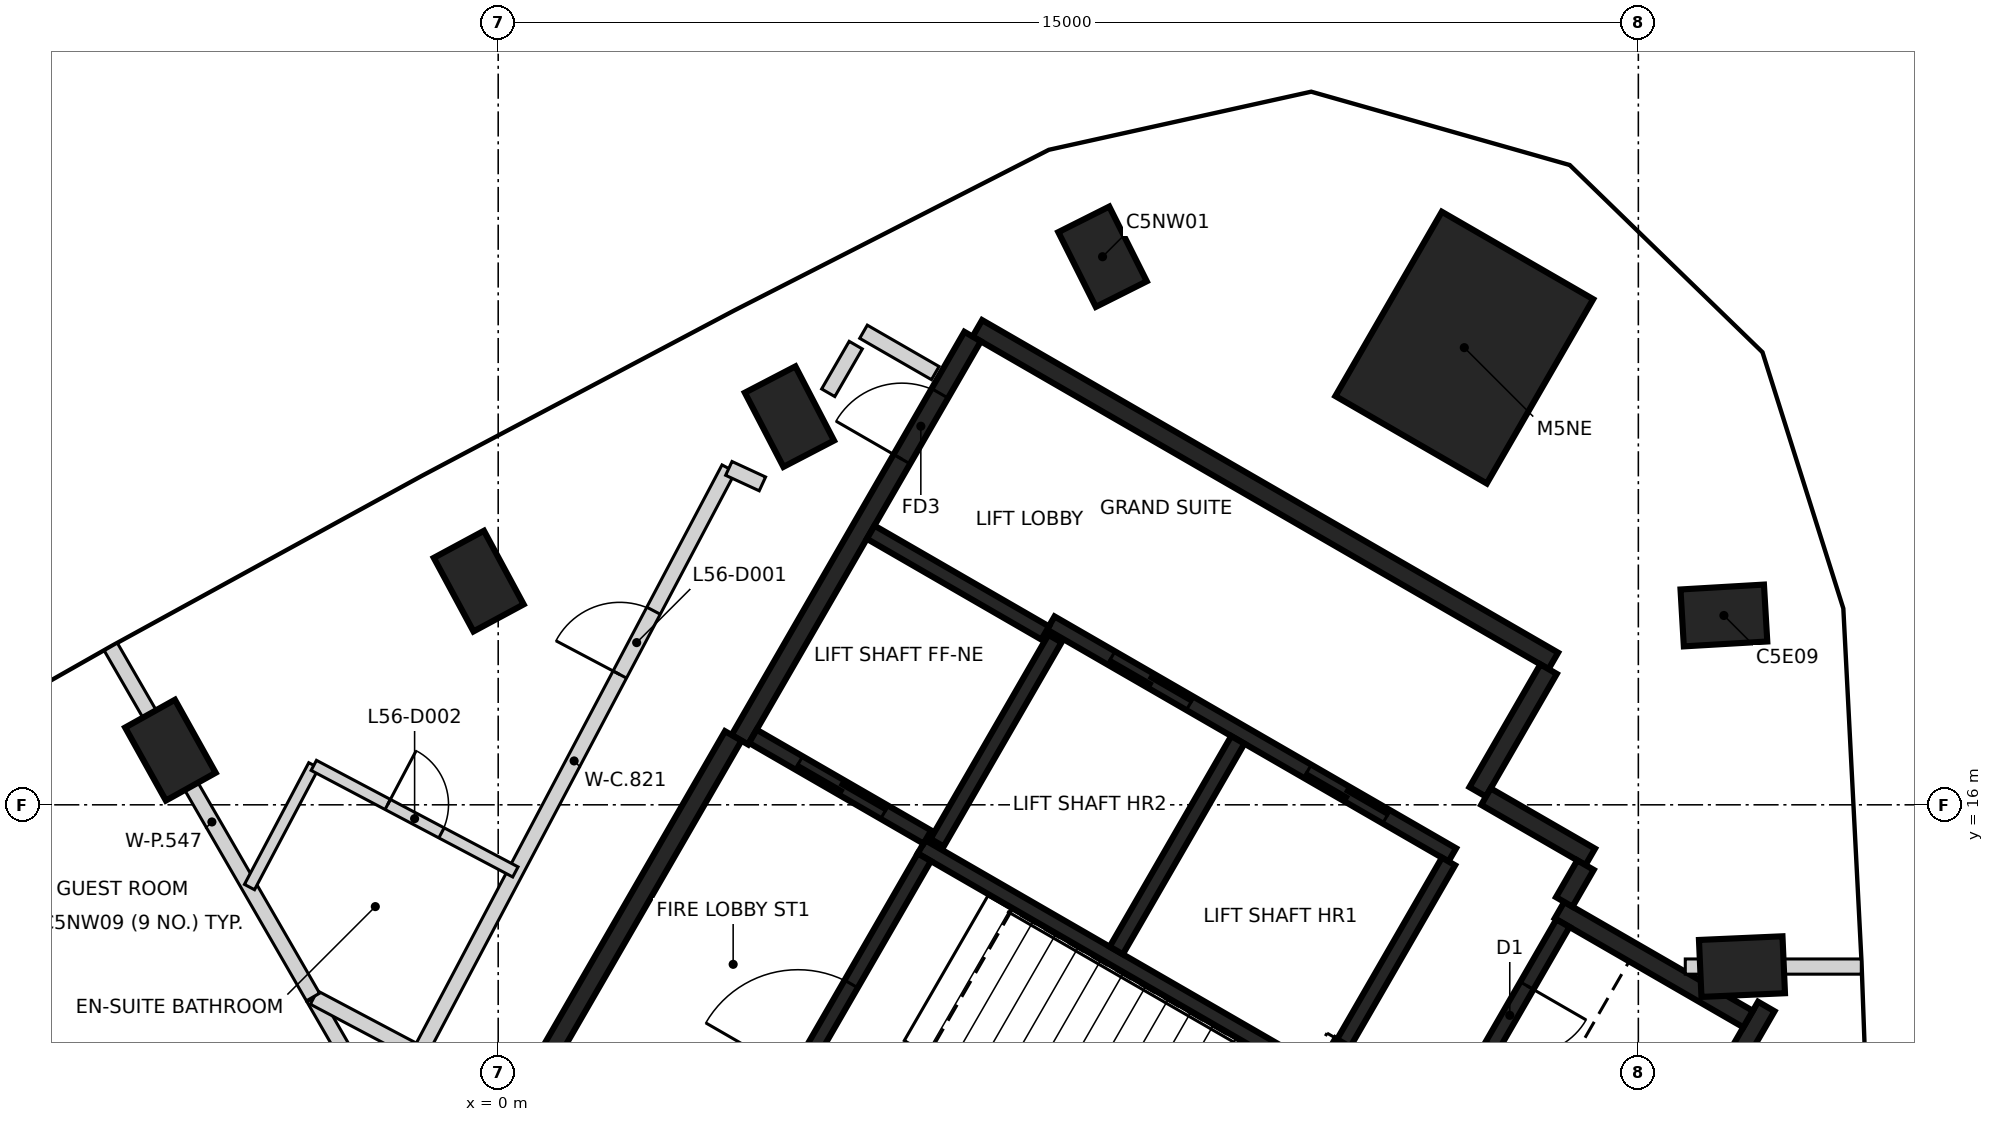
"""IFC4 building model, lengths in metres.
Left out: names, types, materials, properties, quantities, classifications, styles, units other than length and angle.
Written with IfcOpenShell. Run it as: python <this file> out.ifc"""

import sys

from ifc_helpers import new_model, si_unit, direction, frame, frame_2d, origin, origin_2d, place, context, subcontext, project, spatial, rectangle, extrude, element, fill, save


model = new_model("IFC4")
c1 = context("Model", 3, precision=1e-05, world=origin(), true_north=direction((0.0, 1.0)))
c2 = subcontext(c1, "Body", "Model", "MODEL_VIEW")
j1 = project(units=[si_unit("LENGTHUNIT", "METRE"), si_unit("PLANEANGLEUNIT", "RADIAN")], contexts=[c1])
p1 = place(None, origin())
s1 = spatial("IfcSite", under=j1, at=p1, CompositionType="ELEMENT")
p2 = place(p1, origin())
s2 = spatial("IfcBuilding", under=s1, at=p2, CompositionType="ELEMENT")
p3 = place(p2, frame((0.0, 0.0, 225.0)))
s3 = spatial("IfcBuildingStorey", under=s2, at=p3, CompositionType="ELEMENT", Elevation=225.0)
for number, where, z_axis, x_axis in (
    (1, (16.363, 13.872, -0.35), (0.0, 0.0, 1.0), (0.999, 0.044, 0.0)),
    (2, (16.125, 18.491, -0.35), (0.0, 0.0, 1.0), (0.998, 0.058, 0.0)),
    (3, (7.951, 23.211, -0.35), (0.0, 0.0, 1.0), (-0.449, 0.894, 0.0)),
    (4, (3.832, 21.107, -0.35), (0.0, 0.0, 1.0), (-0.461, 0.887, 0.0)),
    (5, (-0.256, 18.943, -0.35), (0.0, 0.0, 1.0), (-0.475, 0.88, 0.0)),
    (6, (-4.312, 16.719, -0.35), (0.0, 0.0, 1.0), (-0.487, 0.873, 0.0)),
):
    element("IfcColumn", number, at=place(p3, frame(where, z_axis=z_axis, x_axis=x_axis)), inside=s3, PredefinedType="COLUMN", context=c2, shape_type="SweptSolid", body=[
        extrude(rectangle(XDim=1.1, YDim=0.75, at=origin_2d()), origin(), (0.0, 0.0, 1.0), 3.6),
    ])
p4 = place(p3, frame((12.71, 22.015, -0.35), z_axis=(0.0, 0.0, 1.0), x_axis=(0.5, 0.866025403784, 0.0)))
e7 = element("IfcColumn", 7, at=p4, inside=s3, PredefinedType="COLUMN", context=c2, shape_type="SweptSolid", body=[
    extrude(rectangle(XDim=2.8, YDim=2.3, at=origin_2d()), origin(), (0.0, 0.0, 1.0), 3.6),
])
p5 = place(p3, frame((6.304, 22.269, 0.0), z_axis=(0.0, 0.0, 1.0), x_axis=(0.866022959057, -0.500004234368, 0.0)))
e8 = element("IfcWall", 8, at=p5, inside=s3, PredefinedType="SHEAR", context=c2, shape_type="SweptSolid", body=[
    extrude(rectangle(XDim=8.75, YDim=0.25, at=frame_2d((4.375, 0.0))), origin(), (0.0, 0.0, 1.0), 3.25),
])
p6 = place(p3, frame((3.179, 16.856, 0.0), z_axis=(0.0, 0.0, 1.0), x_axis=(0.500001955336, 0.866024274868, 0.0)))
e9 = element("IfcWall", 9, at=p6, inside=s3, PredefinedType="SHEAR", context=c2, shape_type="SweptSolid", body=[
    extrude(rectangle(XDim=6.125, YDim=0.25, at=frame_2d((3.062, 0.0))), origin(), (0.0, 0.0, 1.0), 3.25),
])
p7 = place(p6, frame((4.263, 0.0, 0.0)))
e10 = element("IfcOpeningElement", 10, at=p7, cuts=e9, PredefinedType="OPENING", context=c2, shape_type="SweptSolid", body=[
    extrude(rectangle(XDim=1.0, YDim=2.1, at=frame_2d((0.5, 1.05))), frame((0.0, 0.135, 0.0), z_axis=(0.0, -1.0, 0.0), x_axis=(1.0, 0.0, 0.0)), (0.0, 0.0, 1.0), 0.27),
])
p8 = place(p3, frame((0.48, 12.381, 0.0), z_axis=(0.0, 0.0, 1.0), x_axis=(0.49999885962, 0.866026062182, 0.0)))
e11 = element("IfcWall", 11, at=p8, inside=s3, PredefinedType="SHEAR", context=c2, shape_type="SweptSolid", body=[
    extrude(rectangle(XDim=5.225, YDim=0.25, at=frame_2d((2.612, 0.0))), origin(), (0.0, 0.0, 1.0), 3.25),
])
p9 = place(p3, frame((16.684, 13.347, 0.0), z_axis=(0.0, 0.0, 1.0), x_axis=(-0.499998874531, -0.866026053573, 0.0)))
e12 = element("IfcWall", 12, at=p9, inside=s3, PredefinedType="SHEAR", context=c2, shape_type="SweptSolid", body=[
    extrude(rectangle(XDim=3.313, YDim=0.25, at=frame_2d((1.656, 0.0))), origin(), (0.0, 0.0, 1.0), 3.25),
])
p10 = place(p3, frame((13.963, 14.614, 0.0), z_axis=(0.0, 0.0, 1.0), x_axis=(0.866042235819, -0.499970844928, 0.0)))
e13 = element("IfcWall", 13, at=p10, inside=s3, PredefinedType="SHEAR", context=c2, shape_type="SweptSolid", body=[
    extrude(rectangle(XDim=2.865, YDim=0.25, at=frame_2d((1.432, 0.0))), origin(), (0.0, 0.0, 1.0), 3.25),
])
p11 = place(p3, frame((13.819, 17.785, 0.0), z_axis=(0.0, 0.0, 1.0), x_axis=(-0.500039802285, -0.866002422705, 0.0)))
e14 = element("IfcWall", 14, at=p11, inside=s3, PredefinedType="SHEAR", context=c2, shape_type="SweptSolid", body=[
    extrude(rectangle(XDim=1.865, YDim=0.25, at=frame_2d((0.932, 0.0))), origin(), (0.0, 0.0, 1.0), 3.25),
])
p12 = place(p3, frame((12.433, 11.964, 0.0), z_axis=(0.0, 0.0, 1.0), x_axis=(-0.866038183914, 0.499977863513, 0.0)))
e15 = element("IfcWall", 15, at=p12, inside=s3, PredefinedType="SHEAR", context=c2, shape_type="SweptSolid", body=[
    extrude(rectangle(XDim=1.71, YDim=0.25, at=frame_2d((0.855, 0.0))), origin(), (0.0, 0.0, 1.0), 3.25),
])
p13 = place(p3, frame((12.995, 16.108, 0.0), z_axis=(0.0, 0.0, 1.0), x_axis=(0.866044474677, -0.49996696679, 0.0)))
e16 = element("IfcWall", 16, at=p13, inside=s3, PredefinedType="SHEAR", context=c2, shape_type="SweptSolid", body=[
    extrude(rectangle(XDim=1.584, YDim=0.25, at=frame_2d((0.792, 0.0))), origin(), (0.0, 0.0, 1.0), 3.25),
])
p14 = place(p3, frame((14.305, 15.207, 0.0), z_axis=(0.0, 0.0, 1.0), x_axis=(-0.499848422343, -0.866112899501, 0.0)))
e17 = element("IfcWall", 17, at=p14, inside=s3, PredefinedType="SHEAR", context=c2, shape_type="SweptSolid", body=[
    extrude(rectangle(XDim=0.559, YDim=0.25, at=frame_2d((0.28, 0.0))), origin(), (0.0, 0.0, 1.0), 3.25),
])
p15 = place(p3, frame((12.552, 15.342, 0.0), z_axis=(0.0, 0.0, 1.0), x_axis=(-0.866030299012, 0.499991521122, 0.0)))
e18 = element("IfcWall", 18, at=p15, inside=s3, PredefinedType="SHEAR", context=c2, shape_type="SweptSolid", body=[
    extrude(rectangle(XDim=6.1, YDim=0.2, at=frame_2d((3.05, 0.0))), origin(), (0.0, 0.0, 1.0), 3.25),
])
p16 = place(p15, frame((1.0, 0.0, 0.0)))
e19 = element("IfcOpeningElement", 19, at=p16, cuts=e18, PredefinedType="OPENING", context=c2, shape_type="SweptSolid", body=[
    extrude(rectangle(XDim=1.2, YDim=2.1, at=frame_2d((0.6, 1.05))), frame((0.0, 0.11, 0.0), z_axis=(0.0, -1.0, 0.0), x_axis=(1.0, 0.0, 0.0)), (0.0, 0.0, 1.0), 0.22),
])
p17 = place(p15, frame((3.982, 0.0, 0.0)))
e20 = element("IfcOpeningElement", 20, at=p17, cuts=e18, PredefinedType="OPENING", context=c2, shape_type="SweptSolid", body=[
    extrude(rectangle(XDim=1.2, YDim=2.1, at=frame_2d((0.6, 1.05))), frame((0.0, 0.11, 0.0), z_axis=(0.0, -1.0, 0.0), x_axis=(1.0, 0.0, 0.0)), (0.0, 0.0, 1.0), 0.22),
])
p18 = place(p3, frame((10.743, 12.46, 0.0), z_axis=(0.0, 0.0, 1.0), x_axis=(-0.866018848283, 0.500011354289, 0.0)))
e21 = element("IfcWall", 21, at=p18, inside=s3, PredefinedType="SHEAR", context=c2, shape_type="SweptSolid", body=[
    extrude(rectangle(XDim=5.974, YDim=0.2, at=frame_2d((2.987, 0.0))), origin(), (0.0, 0.0, 1.0), 3.25),
])
p19 = place(p3, frame((3.057, 10.895, 0.0), z_axis=(0.0, 0.0, 1.0), x_axis=(0.500027839223, 0.866009330205, 0.0)))
e22 = element("IfcWall", 22, at=p19, inside=s3, PredefinedType="SHEAR", context=c2, shape_type="SweptSolid", body=[
    extrude(rectangle(XDim=5.098, YDim=0.2, at=frame_2d((2.549, 0.0))), origin(), (0.0, 0.0, 1.0), 3.25),
])
p20 = place(p19, frame((1.774, 0.0, 0.0)))
e23 = element("IfcOpeningElement", 23, at=p20, cuts=e22, PredefinedType="OPENING", context=c2, shape_type="SweptSolid", body=[
    extrude(rectangle(XDim=1.4, YDim=2.1, at=frame_2d((0.7, 1.05))), frame((0.0, 0.11, 0.0), z_axis=(0.0, -1.0, 0.0), x_axis=(1.0, 0.0, 0.0)), (0.0, 0.0, 1.0), 0.22),
])
p21 = place(p3, frame((8.132, 14.084, 0.0), z_axis=(0.0, 0.0, 1.0), x_axis=(0.500030834389, 0.86600760081, 0.0)))
e24 = element("IfcWall", 24, at=p21, inside=s3, PredefinedType="SHEAR", context=c2, shape_type="SweptSolid", body=[
    extrude(rectangle(XDim=3.198, YDim=0.2, at=frame_2d((1.599, 0.0))), origin(), (0.0, 0.0, 1.0), 3.25),
])
p22 = place(p3, frame((14.008, 14.442, 0.0), z_axis=(0.0, 0.0, 1.0), x_axis=(-0.499986818241, -0.866033014143, 0.0)))
e25 = element("IfcWall", 25, at=p22, inside=s3, PredefinedType="SHEAR", context=c2, shape_type="SweptSolid", body=[
    extrude(rectangle(XDim=2.798, YDim=0.2, at=frame_2d((1.399, 0.0))), origin(), (0.0, 0.0, 1.0), 3.25),
])
p23 = place(p22, frame((0.949, 0.0, 0.0)))
e26 = element("IfcOpeningElement", 26, at=p23, cuts=e25, PredefinedType="OPENING", context=c2, shape_type="SweptSolid", body=[
    extrude(rectangle(XDim=0.9, YDim=2.1, at=frame_2d((0.45, 1.05))), frame((0.0, 0.11, 0.0), z_axis=(0.0, -1.0, 0.0), x_axis=(1.0, 0.0, 0.0)), (0.0, 0.0, 1.0), 0.22),
])
p24 = place(p3, frame((12.502, 15.255, 0.0), z_axis=(0.0, 0.0, 1.0), x_axis=(-0.499965018551, -0.866045599391, 0.0)))
e27 = element("IfcWall", 27, at=p24, inside=s3, PredefinedType="SHEAR", context=c2, shape_type="SweptSolid", body=[
    extrude(rectangle(XDim=2.759, YDim=0.2, at=frame_2d((1.379, 0.0))), origin(), (0.0, 0.0, 1.0), 3.25),
])
p25 = place(p3, frame((7.324, 18.187, 0.0), z_axis=(0.0, 0.0, 1.0), x_axis=(-0.499967891604, -0.866043940782, 0.0)))
e28 = element("IfcWall", 28, at=p25, inside=s3, PredefinedType="SHEAR", context=c2, shape_type="SweptSolid", body=[
    extrude(rectangle(XDim=3.1, YDim=0.2, at=frame_2d((1.55, 0.0))), origin(), (0.0, 0.0, 1.0), 3.25),
])
p26 = place(p3, frame((5.646, 15.576, 0.0), z_axis=(0.0, 0.0, 1.0), x_axis=(-0.866018407898, 0.500012117035, 0.0)))
e29 = element("IfcWall", 29, at=p26, inside=s3, PredefinedType="SHEAR", context=c2, shape_type="SweptSolid", body=[
    extrude(rectangle(XDim=2.651, YDim=0.2, at=frame_2d((1.325, 0.0))), origin(), (0.0, 0.0, 1.0), 3.25),
])
p27 = place(p26, frame((0.652, 0.0, 0.0)))
e30 = element("IfcOpeningElement", 30, at=p27, cuts=e29, PredefinedType="OPENING", context=c2, shape_type="SweptSolid", body=[
    extrude(rectangle(XDim=1.3, YDim=2.1, at=frame_2d((0.65, 1.05))), frame((0.0, 0.11, 0.0), z_axis=(0.0, -1.0, 0.0), x_axis=(1.0, 0.0, 0.0)), (0.0, 0.0, 1.0), 0.22),
])
p28 = place(p3, frame((7.196, 18.26, 0.0), z_axis=(0.0, 0.0, 1.0), x_axis=(-0.866018407898, 0.500012117035, 0.0)))
e31 = element("IfcWall", 31, at=p28, inside=s3, PredefinedType="SHEAR", context=c2, shape_type="SweptSolid", body=[
    extrude(rectangle(XDim=2.651, YDim=0.2, at=frame_2d((1.325, 0.0))), origin(), (0.0, 0.0, 1.0), 3.25),
])
p29 = place(p3, frame((-2.43, 13.459, 0.0), z_axis=(0.0, 0.0, 1.0), x_axis=(0.499957265187, -0.866050075334, 0.0)))
e32 = element("IfcWall", 32, at=p29, inside=s3, PredefinedType="PARTITIONING", context=c2, shape_type="SweptSolid", body=[
    extrude(rectangle(XDim=6.87, YDim=0.2, at=frame_2d((3.435, 0.0))), origin(), (0.0, 0.0, 1.0), 3.25),
])
p30 = place(p29, frame((3.275, 0.0, 0.0)))
e33 = element("IfcOpeningElement", 33, at=p30, cuts=e32, PredefinedType="OPENING", context=c2, shape_type="SweptSolid", body=[
    extrude(rectangle(XDim=1.0, YDim=2.1, at=frame_2d((0.5, 1.05))), frame((0.0, 0.11, 0.0), z_axis=(0.0, -1.0, 0.0), x_axis=(1.0, 0.0, 0.0)), (0.0, 0.0, 1.0), 0.22),
])
p31 = place(p3, frame((-2.425, 13.465, 0.0), z_axis=(0.0, 0.0, 1.0), x_axis=(0.883874806572, -0.467723557572, 0.0)))
e34 = element("IfcWall", 34, at=p31, inside=s3, PredefinedType="PARTITIONING", context=c2, shape_type="SweptSolid", body=[
    extrude(rectangle(XDim=1.572, YDim=0.2, at=frame_2d((0.786, 0.0))), origin(), (0.0, 0.0, 1.0), 3.25),
])
p32 = place(p3, frame((-1.035, 12.73, 0.0), z_axis=(0.0, 0.0, 1.0), x_axis=(0.46738248691, 0.884055208078, 0.0)))
e35 = element("IfcWall", 35, at=p32, inside=s3, PredefinedType="PARTITIONING", context=c2, shape_type="SweptSolid", body=[
    extrude(rectangle(XDim=8.705, YDim=0.2, at=frame_2d((4.352, 0.0))), origin(), (0.0, 0.0, 1.0), 3.25),
])
p33 = place(p32, frame((5.638, 0.0, 0.0)))
e36 = element("IfcOpeningElement", 36, at=p33, cuts=e35, PredefinedType="OPENING", context=c2, shape_type="SweptSolid", body=[
    extrude(rectangle(XDim=0.95, YDim=2.1, at=frame_2d((0.475, 1.05))), frame((0.0, 0.11, 0.0), z_axis=(0.0, -1.0, 0.0), x_axis=(1.0, 0.0, 0.0)), (0.0, 0.0, 1.0), 0.22),
])
p34 = place(p3, frame((3.034, 20.426, 0.0), z_axis=(0.0, 0.0, 1.0), x_axis=(0.907930035436, -0.41912176125, 0.0)))
e37 = element("IfcWall", 37, at=p34, inside=s3, PredefinedType="PARTITIONING", context=c2, shape_type="SweptSolid", body=[
    extrude(rectangle(XDim=0.487, YDim=0.2, at=frame_2d((0.244, 0.0))), origin(), (0.0, 0.0, 1.0), 3.25),
])
p35 = place(p3, frame((4.342, 21.421, 0.0), z_axis=(0.0, 0.0, 1.0), x_axis=(0.500238258503, 0.865887801468, 0.0)))
e38 = element("IfcWall", 38, at=p35, inside=s3, PredefinedType="PARTITIONING", context=c2, shape_type="SweptSolid", body=[
    extrude(rectangle(XDim=0.724, YDim=0.2, at=frame_2d((0.362, 0.0))), origin(), (0.0, 0.0, 1.0), 2.35),
])
p36 = place(p3, frame((4.806, 22.224, 0.0), z_axis=(0.0, 0.0, 1.0), x_axis=(0.866334698307, -0.499463903109, 0.0)))
e39 = element("IfcWall", 39, at=p36, inside=s3, PredefinedType="PARTITIONING", context=c2, shape_type="SweptSolid", body=[
    extrude(rectangle(XDim=1.09, YDim=0.2, at=frame_2d((0.545, 0.0))), origin(), (0.0, 0.0, 1.0), 2.35),
])
p37 = place(p3, frame((-9.119, 15.795, 0.0), z_axis=(0.0, 0.0, 1.0), x_axis=(0.50001601051, -0.866016159915, 0.0)))
e40 = element("IfcWall", 40, at=p37, inside=s3, PredefinedType="PARTITIONING", context=c2, shape_type="SweptSolid", body=[
    extrude(rectangle(XDim=12.238, YDim=0.2, at=frame_2d((6.119, 0.0))), origin(), (0.0, 0.0, 1.0), 3.25),
])
p38 = place(p3, frame((-5.097, 18.078, 0.0), z_axis=(0.0, 0.0, 1.0), x_axis=(0.50004820116, -0.865997573043, 0.0)))
e41 = element("IfcWall", 41, at=p38, inside=s3, PredefinedType="PARTITIONING", context=c2, shape_type="SweptSolid", body=[
    extrude(rectangle(XDim=5.32, YDim=0.2, at=frame_2d((2.66, 0.0))), origin(), (0.0, 0.0, 1.0), 3.25),
])
p39 = place(p3, frame((15.618, 13.872, 0.0), z_axis=(0.0, 0.0, 1.0), x_axis=(1.0, 0.0, 0.0)))
e42 = element("IfcWall", 42, at=p39, inside=s3, PredefinedType="PARTITIONING", context=c2, shape_type="SweptSolid", body=[
    extrude(rectangle(XDim=2.316, YDim=0.2, at=frame_2d((1.158, 0.0))), origin(), (0.0, 0.0, 1.0), 3.25),
])
p40 = place(p3, frame((-3.272, 14.918, 0.0), z_axis=(0.0, 0.0, 1.0), x_axis=(0.467162796658, 0.884171319043, 0.0)))
e43 = element("IfcWall", 43, at=p40, inside=s3, PredefinedType="PARTITIONING", context=c2, shape_type="SweptSolid", body=[
    extrude(rectangle(XDim=1.811, YDim=0.15, at=frame_2d((0.905, 0.0))), origin(), (0.0, 0.0, 1.0), 3.25),
])
p41 = place(p3, frame((-2.426, 16.519, 0.0), z_axis=(0.0, 0.0, 1.0), x_axis=(0.884056991815, -0.467379112952, 0.0)))
e44 = element("IfcWall", 44, at=p41, inside=s3, PredefinedType="PARTITIONING", context=c2, shape_type="SweptSolid", body=[
    extrude(rectangle(XDim=3.0, YDim=0.15, at=frame_2d((1.5, 0.0))), origin(), (0.0, 0.0, 1.0), 3.25),
])
p42 = place(p41, frame((1.1, 0.0, 0.0)))
e45 = element("IfcOpeningElement", 45, at=p42, cuts=e44, PredefinedType="OPENING", context=c2, shape_type="SweptSolid", body=[
    extrude(rectangle(XDim=0.8, YDim=2.1, at=frame_2d((0.4, 1.05))), frame((0.0, 0.085, 0.0), z_axis=(0.0, -1.0, 0.0), x_axis=(1.0, 0.0, 0.0)), (0.0, 0.0, 1.0), 0.17),
])
p43 = place(p27, origin())
e46 = element("IfcDoor", 46, at=p43, inside=s3, OperationType="SLIDING_TO_RIGHT", PredefinedType="DOOR", context=c2, shape_type="SweptSolid", body=[
    extrude(rectangle(XDim=1.3, YDim=2.1, at=frame_2d((0.65, 1.05))), frame((0.0, 0.025, 0.0), z_axis=(0.0, -1.0, 0.0), x_axis=(1.0, 0.0, 0.0)), (0.0, 0.0, 1.0), 0.05),
])
fill(e30, e46)
p44 = place(p16, origin())
e47 = element("IfcDoor", 47, at=p44, inside=s3, OperationType="DOUBLE_DOOR_SLIDING", PredefinedType="DOOR", context=c2, shape_type="SweptSolid", body=[
    extrude(rectangle(XDim=1.2, YDim=2.1, at=frame_2d((0.6, 1.05))), frame((0.0, 0.025, 0.0), z_axis=(0.0, -1.0, 0.0), x_axis=(1.0, 0.0, 0.0)), (0.0, 0.0, 1.0), 0.05),
])
fill(e19, e47)
p45 = place(p17, origin())
e48 = element("IfcDoor", 48, at=p45, inside=s3, OperationType="DOUBLE_DOOR_SLIDING", PredefinedType="DOOR", context=c2, shape_type="SweptSolid", body=[
    extrude(rectangle(XDim=1.2, YDim=2.1, at=frame_2d((0.6, 1.05))), frame((0.0, 0.025, 0.0), z_axis=(0.0, -1.0, 0.0), x_axis=(1.0, 0.0, 0.0)), (0.0, 0.0, 1.0), 0.05),
])
fill(e20, e48)
p46 = place(p7, origin())
e49 = element("IfcDoor", 49, at=p46, inside=s3, OperationType="SINGLE_SWING_LEFT", PredefinedType="DOOR", context=c2, shape_type="SweptSolid", body=[
    extrude(rectangle(XDim=1.0, YDim=2.1, at=frame_2d((0.5, 1.05))), frame((0.0, 0.025, 0.0), z_axis=(0.0, -1.0, 0.0), x_axis=(1.0, 0.0, 0.0)), (0.0, 0.0, 1.0), 0.05),
])
fill(e10, e49)
p47 = place(p20, origin())
e50 = element("IfcDoor", 50, at=p47, inside=s3, OperationType="SINGLE_SWING_RIGHT", PredefinedType="DOOR", context=c2, shape_type="SweptSolid", body=[
    extrude(rectangle(XDim=1.4, YDim=2.1, at=frame_2d((0.7, 1.05))), frame((0.0, 0.025, 0.0), z_axis=(0.0, -1.0, 0.0), x_axis=(1.0, 0.0, 0.0)), (0.0, 0.0, 1.0), 0.05),
])
fill(e23, e50)
p48 = place(p23, origin())
e51 = element("IfcDoor", 51, at=p48, inside=s3, OperationType="SINGLE_SWING_LEFT", PredefinedType="DOOR", context=c2, shape_type="SweptSolid", body=[
    extrude(rectangle(XDim=0.9, YDim=2.1, at=frame_2d((0.45, 1.05))), frame((0.0, 0.025, 0.0), z_axis=(0.0, -1.0, 0.0), x_axis=(1.0, 0.0, 0.0)), (0.0, 0.0, 1.0), 0.05),
])
fill(e26, e51)
p49 = place(p33, frame((0.95, 0.0, 0.0), z_axis=(0.0, 0.0, 1.0), x_axis=(-1.0, 0.0, 0.0)))
e52 = element("IfcDoor", 52, at=p49, inside=s3, OperationType="SINGLE_SWING_LEFT", PredefinedType="DOOR", context=c2, shape_type="SweptSolid", body=[
    extrude(rectangle(XDim=0.95, YDim=2.1, at=frame_2d((0.475, 1.05))), frame((0.0, 0.025, 0.0), z_axis=(0.0, -1.0, 0.0), x_axis=(1.0, 0.0, 0.0)), (0.0, 0.0, 1.0), 0.05),
])
fill(e36, e52)
p50 = place(p42, origin())
e53 = element("IfcDoor", 53, at=p50, inside=s3, OperationType="SINGLE_SWING_LEFT", PredefinedType="DOOR", context=c2, shape_type="SweptSolid", body=[
    extrude(rectangle(XDim=0.8, YDim=2.1, at=frame_2d((0.4, 1.05))), frame((0.0, 0.025, 0.0), z_axis=(0.0, -1.0, 0.0), x_axis=(1.0, 0.0, 0.0)), (0.0, 0.0, 1.0), 0.05),
])
fill(e45, e53)
save(model, sys.argv[1])
